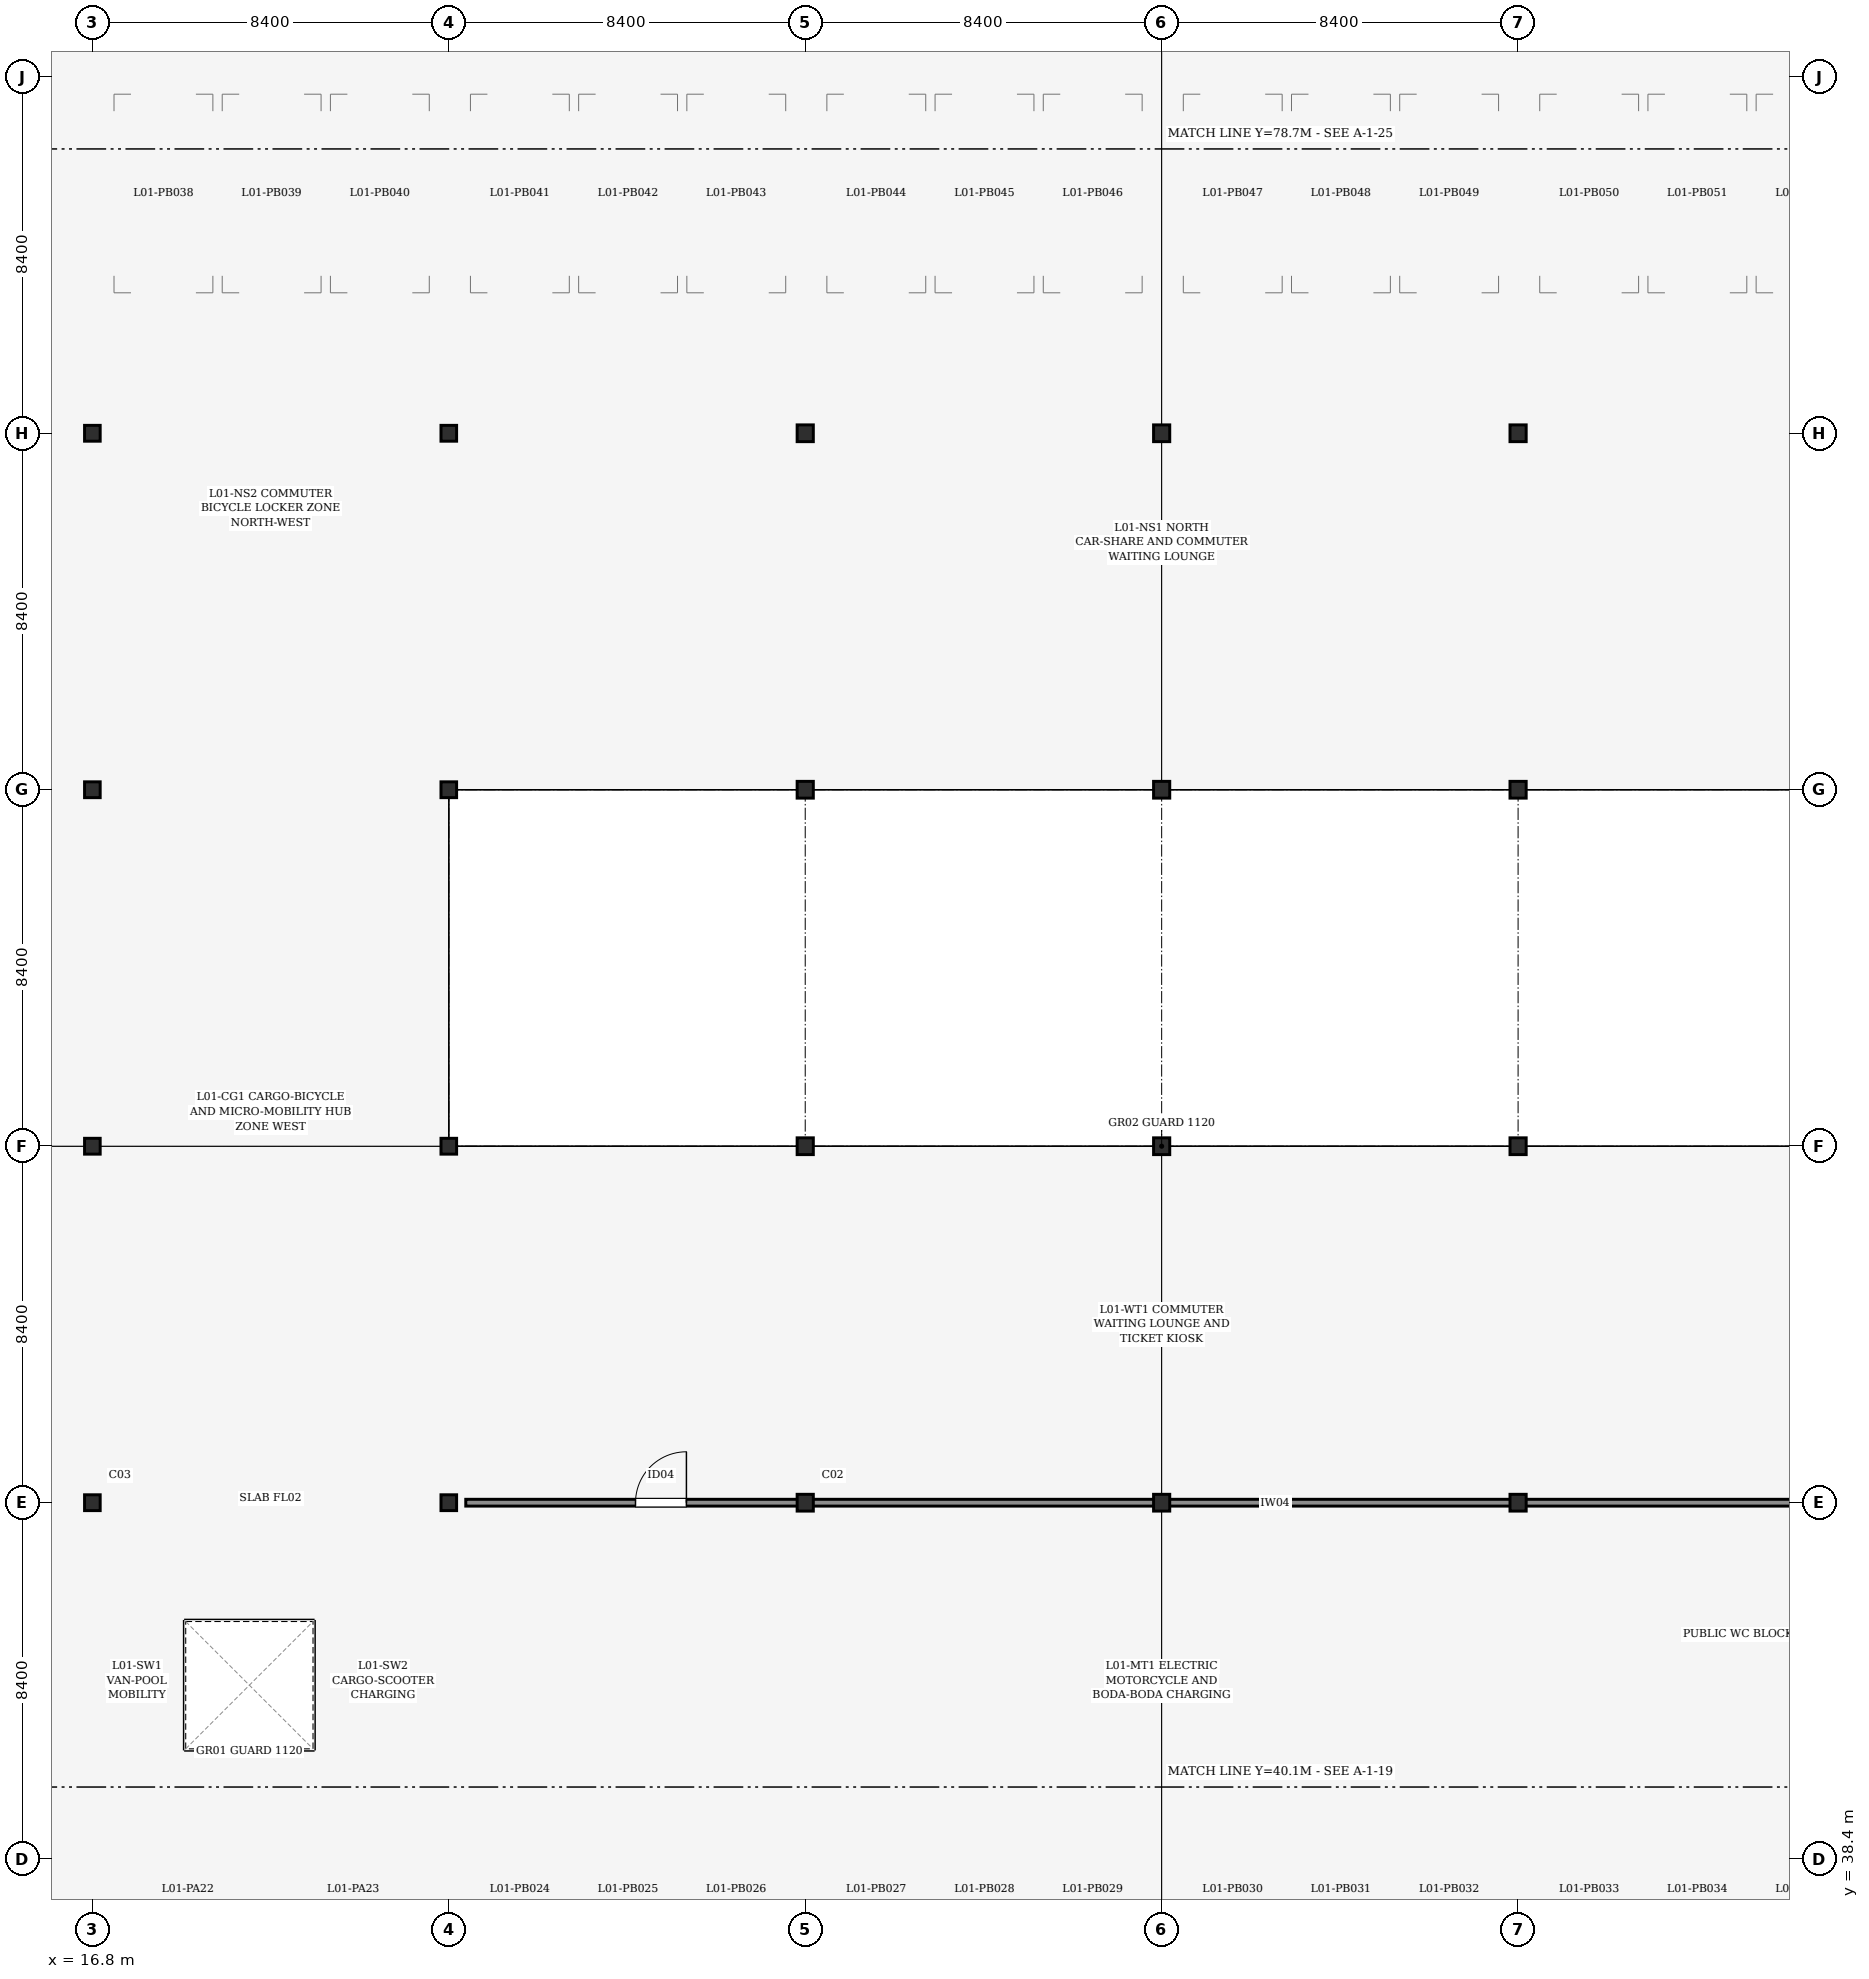
"""IFC4 building model, lengths in metres.
Left out: names, types, materials, properties, quantities, classifications, styles, units other than length and angle.
Written with IfcOpenShell. Run it as: python <this file> out.ifc"""

import sys

from ifc_helpers import new_model, si_unit, direction, frame, frame_2d, origin, origin_2d, place, context, subcontext, project, spatial, rectangle, i_section, extrude, element, fill, save


model = new_model("IFC4")
c1 = context("Model", 3, precision=1e-05, world=origin(), true_north=direction((0.0, 1.0)))
c2 = subcontext(c1, "Body", "Model", "MODEL_VIEW")
j1 = project(units=[si_unit("LENGTHUNIT", "METRE"), si_unit("PLANEANGLEUNIT", "RADIAN")], contexts=[c1])
p1 = place(None, origin())
s1 = spatial("IfcSite", under=j1, at=p1, CompositionType="ELEMENT")
p2 = place(p1, origin())
s2 = spatial("IfcBuilding", under=s1, at=p2, CompositionType="ELEMENT")
p3 = place(p2, frame((0.0, 0.0, 5.4)))
s3 = spatial("IfcBuildingStorey", under=s2, at=p3, CompositionType="ELEMENT", Elevation=5.4)
for number, where, z_axis, x_axis in (
    (1, (16.8, 38.4, 0.0), (0.0, 0.0, 1.0), (1.0, 0.0, 0.0)),
    (2, (16.8, 46.8, 0.0), (0.0, 0.0, 1.0), (1.0, 0.0, 0.0)),
    (3, (16.8, 55.2, 0.0), (0.0, 0.0, 1.0), (1.0, 0.0, 0.0)),
    (4, (16.8, 63.6, 0.0), (0.0, 0.0, 1.0), (1.0, 0.0, 0.0)),
    (5, (16.8, 72.0, 0.0), (0.0, 0.0, 1.0), (1.0, 0.0, 0.0)),
    (6, (16.8, 80.4, 0.0), (0.0, 0.0, 1.0), (1.0, 0.0, 0.0)),
    (7, (25.2, 38.4, 0.0), (0.0, 0.0, 1.0), (1.0, 0.0, 0.0)),
    (8, (25.2, 46.8, 0.0), (0.0, 0.0, 1.0), (1.0, 0.0, 0.0)),
    (9, (25.2, 55.2, 0.0), (0.0, 0.0, 1.0), (1.0, 0.0, 0.0)),
    (10, (25.2, 63.6, 0.0), (0.0, 0.0, 1.0), (1.0, 0.0, 0.0)),
    (11, (25.2, 72.0, 0.0), (0.0, 0.0, 1.0), (1.0, 0.0, 0.0)),
    (12, (25.2, 80.4, 0.0), (0.0, 0.0, 1.0), (1.0, 0.0, 0.0)),
):
    element("IfcColumn", number, at=place(p3, frame(where, z_axis=z_axis, x_axis=x_axis)), inside=s3, PredefinedType="COLUMN", context=c2, shape_type="SweptSolid", body=[
        extrude(i_section(OverallWidth=0.373, OverallDepth=0.368, WebThickness=0.014, FlangeThickness=0.024, FilletRadius=0.015, at=origin_2d()), origin(), (0.0, 0.0, 1.0), 3.6),
    ])
for number, where, z_axis, x_axis in (
    (13, (33.6, 38.4, 0.0), (0.0, 0.0, 1.0), (1.0, 0.0, 0.0)),
    (14, (33.6, 46.8, 0.0), (0.0, 0.0, 1.0), (1.0, 0.0, 0.0)),
    (15, (33.6, 55.2, 0.0), (0.0, 0.0, 1.0), (1.0, 0.0, 0.0)),
    (16, (33.6, 63.6, 0.0), (0.0, 0.0, 1.0), (1.0, 0.0, 0.0)),
    (17, (33.6, 72.0, 0.0), (0.0, 0.0, 1.0), (1.0, 0.0, 0.0)),
    (18, (33.6, 80.4, 0.0), (0.0, 0.0, 1.0), (1.0, 0.0, 0.0)),
    (19, (42.0, 38.4, 0.0), (0.0, 0.0, 1.0), (1.0, 0.0, 0.0)),
    (20, (42.0, 46.8, 0.0), (0.0, 0.0, 1.0), (1.0, 0.0, 0.0)),
    (21, (42.0, 55.2, 0.0), (0.0, 0.0, 1.0), (1.0, 0.0, 0.0)),
    (22, (42.0, 63.6, 0.0), (0.0, 0.0, 1.0), (1.0, 0.0, 0.0)),
    (23, (42.0, 72.0, 0.0), (0.0, 0.0, 1.0), (1.0, 0.0, 0.0)),
    (24, (42.0, 80.4, 0.0), (0.0, 0.0, 1.0), (1.0, 0.0, 0.0)),
    (25, (50.4, 38.4, 0.0), (0.0, 0.0, 1.0), (1.0, 0.0, 0.0)),
    (26, (50.4, 46.8, 0.0), (0.0, 0.0, 1.0), (1.0, 0.0, 0.0)),
    (27, (50.4, 55.2, 0.0), (0.0, 0.0, 1.0), (1.0, 0.0, 0.0)),
    (28, (50.4, 63.6, 0.0), (0.0, 0.0, 1.0), (1.0, 0.0, 0.0)),
    (29, (50.4, 72.0, 0.0), (0.0, 0.0, 1.0), (1.0, 0.0, 0.0)),
    (30, (50.4, 80.4, 0.0), (0.0, 0.0, 1.0), (1.0, 0.0, 0.0)),
):
    element("IfcColumn", number, at=place(p3, frame(where, z_axis=z_axis, x_axis=x_axis)), inside=s3, PredefinedType="COLUMN", context=c2, shape_type="SweptSolid", body=[
        extrude(i_section(OverallWidth=0.395, OverallDepth=0.381, WebThickness=0.018, FlangeThickness=0.03, FilletRadius=0.015, at=origin_2d()), origin(), (0.0, 0.0, 1.0), 3.6),
    ])
p4 = place(p3, frame((25.6, 46.8, 0.0), z_axis=(0.0, 0.0, 1.0), x_axis=(1.0, 0.0, 0.0)))
e31 = element("IfcWall", 31, at=p4, inside=s3, PredefinedType="PARTITIONING", context=c2, shape_type="SweptSolid", body=[
    extrude(rectangle(XDim=32.8, YDim=0.16, at=frame_2d((16.4, 0.0))), origin(), (0.0, 0.0, 1.0), 2.525),
])
p5 = place(p4, frame((4.0, 0.0, 0.0)))
e32 = element("IfcOpeningElement", 32, at=p5, cuts=e31, PredefinedType="OPENING", context=c2, shape_type="SweptSolid", body=[
    extrude(rectangle(XDim=1.2, YDim=2.15, at=frame_2d((0.6, 1.075))), frame((0.0, 0.09, 0.0), z_axis=(0.0, -1.0, 0.0), x_axis=(1.0, 0.0, 0.0)), (0.0, 0.0, 1.0), 0.18),
])
p6 = place(p5, origin())
e33 = element("IfcDoor", 33, at=p6, inside=s3, OperationType="SINGLE_SWING_RIGHT", PredefinedType="DOOR", context=c2, shape_type="SweptSolid", body=[
    extrude(rectangle(XDim=1.2, YDim=2.15, at=frame_2d((0.6, 1.075))), frame((0.0, 0.025, 0.0), z_axis=(0.0, -1.0, 0.0), x_axis=(1.0, 0.0, 0.0)), (0.0, 0.0, 1.0), 0.05),
])
fill(e32, e33)
save(model, sys.argv[1])
